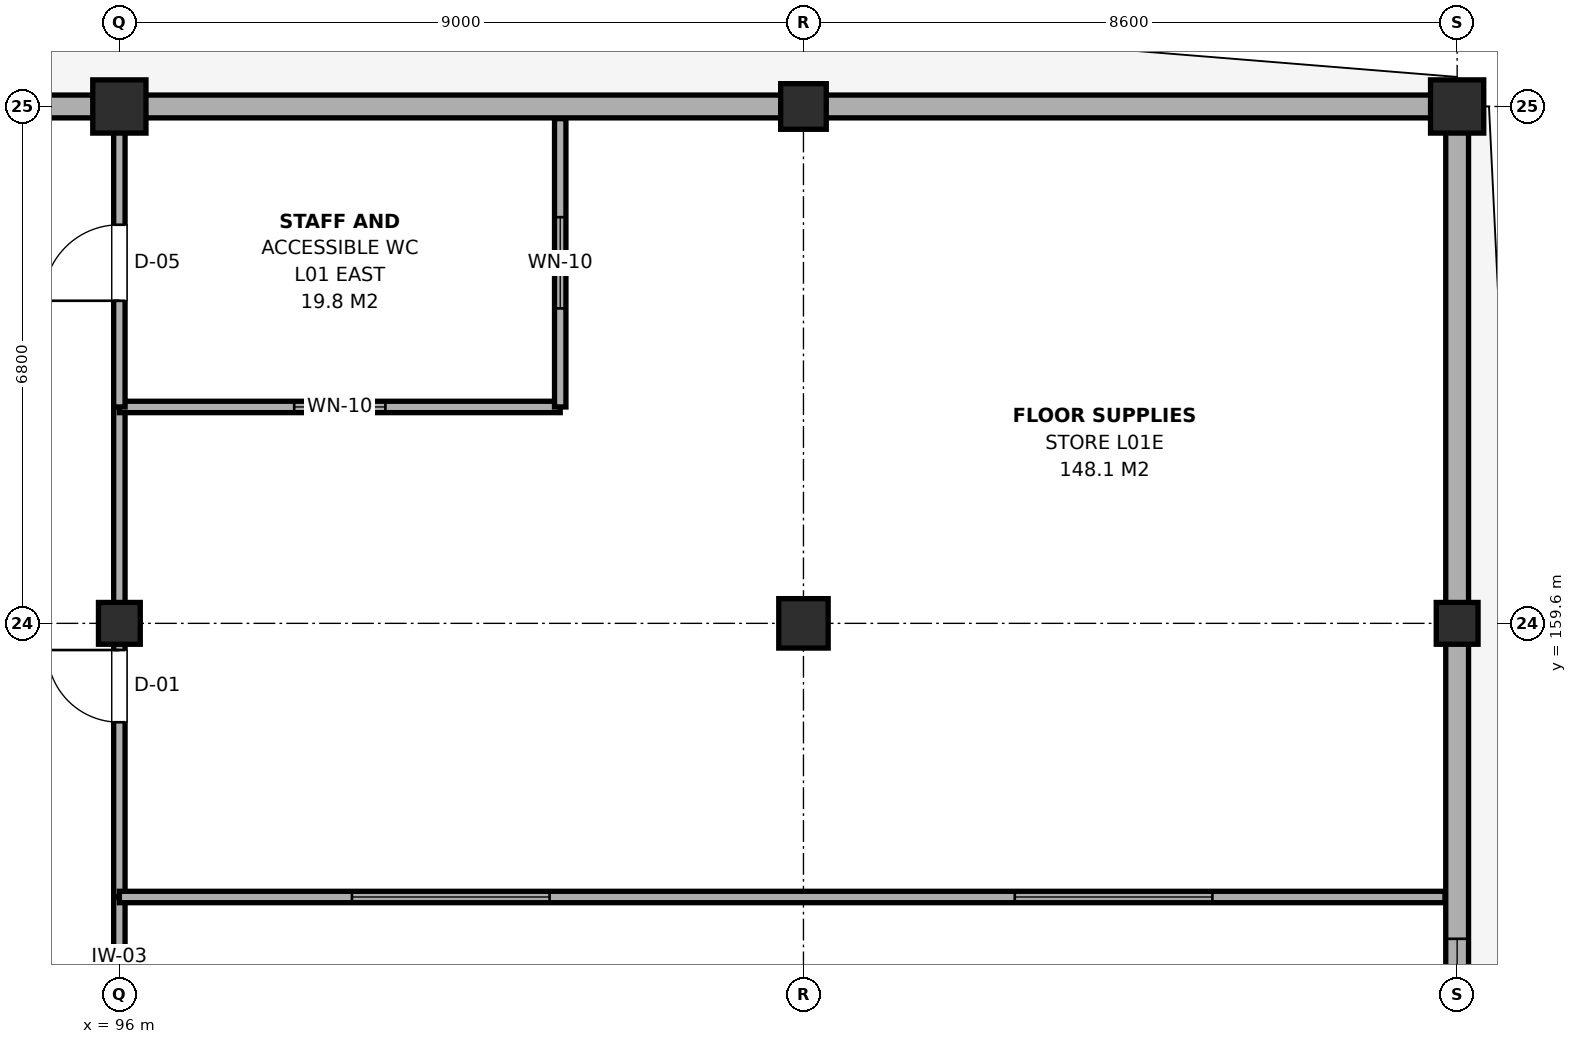
"""IFC4 building model, lengths in metres.
Left out: names, types, materials, properties, quantities, classifications, styles, units other than length and angle.
Written with IfcOpenShell. Run it as: python <this file> out.ifc"""

import sys

from ifc_helpers import new_model, si_unit, direction, frame, frame_2d, origin, origin_2d, place, context, subcontext, project, spatial, rectangle, extrude, element, fill, save


model = new_model("IFC4")
c1 = context("Model", 3, precision=1e-05, world=origin(), true_north=direction((0.0, 1.0)))
c2 = subcontext(c1, "Body", "Model", "MODEL_VIEW")
j1 = project(units=[si_unit("LENGTHUNIT", "METRE"), si_unit("PLANEANGLEUNIT", "RADIAN")], contexts=[c1])
p1 = place(None, origin())
s1 = spatial("IfcSite", under=j1, at=p1, CompositionType="ELEMENT")
p2 = place(p1, origin())
s2 = spatial("IfcBuilding", under=s1, at=p2, CompositionType="ELEMENT")
p3 = place(p2, frame((0.0, 0.0, 4.8)))
s3 = spatial("IfcBuildingStorey", under=s2, at=p3, CompositionType="ELEMENT", Elevation=4.8)
p4 = place(p3, frame((96.0, 159.6, 0.0), z_axis=(0.0, 0.0, 1.0), x_axis=(1.0, 0.0, 0.0)))
e1 = element("IfcColumn", 1, at=p4, inside=s3, PredefinedType="COLUMN", context=c2, shape_type="SweptSolid", body=[
    extrude(rectangle(XDim=0.55, YDim=0.55, at=origin_2d()), origin(), (0.0, 0.0, 1.0), 4.2),
])
p5 = place(p3, frame((96.0, 166.4, 0.0), z_axis=(0.0, 0.0, 1.0), x_axis=(1.0, 0.0, 0.0)))
e2 = element("IfcColumn", 2, at=p5, inside=s3, PredefinedType="COLUMN", context=c2, shape_type="SweptSolid", body=[
    extrude(rectangle(XDim=0.7, YDim=0.7, at=origin_2d()), origin(), (0.0, 0.0, 1.0), 4.2),
])
p6 = place(p3, frame((105.0, 159.6, 0.0), z_axis=(0.0, 0.0, 1.0), x_axis=(1.0, 0.0, 0.0)))
e3 = element("IfcColumn", 3, at=p6, inside=s3, PredefinedType="COLUMN", context=c2, shape_type="SweptSolid", body=[
    extrude(rectangle(XDim=0.65, YDim=0.65, at=origin_2d()), origin(), (0.0, 0.0, 1.0), 4.2),
])
p7 = place(p3, frame((105.0, 166.4, 0.0), z_axis=(0.0, 0.0, 1.0), x_axis=(1.0, 0.0, 0.0)))
e4 = element("IfcColumn", 4, at=p7, inside=s3, PredefinedType="COLUMN", context=c2, shape_type="SweptSolid", body=[
    extrude(rectangle(XDim=0.6, YDim=0.6, at=origin_2d()), origin(), (0.0, 0.0, 1.0), 4.2),
])
p8 = place(p3, frame((113.6, 159.6, 0.0), z_axis=(0.0, 0.0, 1.0), x_axis=(1.0, 0.0, 0.0)))
e5 = element("IfcColumn", 5, at=p8, inside=s3, PredefinedType="COLUMN", context=c2, shape_type="SweptSolid", body=[
    extrude(rectangle(XDim=0.55, YDim=0.55, at=origin_2d()), origin(), (0.0, 0.0, 1.0), 4.2),
])
p9 = place(p3, frame((113.6, 166.4, 0.0), z_axis=(0.0, 0.0, 1.0), x_axis=(1.0, 0.0, 0.0)))
e6 = element("IfcColumn", 6, at=p9, inside=s3, PredefinedType="COLUMN", context=c2, shape_type="SweptSolid", body=[
    extrude(rectangle(XDim=0.7, YDim=0.7, at=origin_2d()), origin(), (0.0, 0.0, 1.0), 4.2),
])
p10 = place(p3, frame((113.6, 152.4, 0.0), z_axis=(0.0, 0.0, 1.0), x_axis=(0.0, 1.0, 0.0)))
e7 = element("IfcWall", 7, at=p10, inside=s3, PredefinedType="SOLIDWALL", context=c2, shape_type="SweptSolid", body=[
    extrude(rectangle(XDim=7.2, YDim=0.3, at=frame_2d((3.6, 0.0))), origin(), (0.0, 0.0, 1.0), 3.375),
])
p11 = place(p10, frame((1.25, 0.0, 1.1)))
e8 = element("IfcOpeningElement", 8, at=p11, cuts=e7, PredefinedType="OPENING", context=c2, shape_type="SweptSolid", body=[
    extrude(rectangle(XDim=1.8, YDim=1.2, at=frame_2d((0.9, 0.6))), frame((0.0, 0.165, 0.0), z_axis=(0.0, -1.0, 0.0), x_axis=(1.0, 0.0, 0.0)), (0.0, 0.0, 1.0), 0.33),
])
p12 = place(p3, frame((113.6, 159.6, 0.0), z_axis=(0.0, 0.0, 1.0), x_axis=(0.0, 1.0, 0.0)))
e9 = element("IfcWall", 9, at=p12, inside=s3, PredefinedType="SOLIDWALL", context=c2, shape_type="SweptSolid", body=[
    extrude(rectangle(XDim=6.95, YDim=0.3, at=frame_2d((3.475, 0.0))), origin(), (0.0, 0.0, 1.0), 3.375),
])
p13 = place(p3, frame((87.0, 166.4, 0.0), z_axis=(0.0, 0.0, 1.0), x_axis=(1.0, 0.0, 0.0)))
e10 = element("IfcWall", 10, at=p13, inside=s3, PredefinedType="SOLIDWALL", context=c2, shape_type="SweptSolid", body=[
    extrude(rectangle(XDim=9.0, YDim=0.3, at=frame_2d((4.5, 0.0))), origin(), (0.0, 0.0, 1.0), 3.485),
])
p14 = place(p13, frame((1.52, 0.0, 0.95)))
e11 = element("IfcOpeningElement", 11, at=p14, cuts=e10, PredefinedType="OPENING", context=c2, shape_type="SweptSolid", body=[
    extrude(rectangle(XDim=2.0, YDim=1.8, at=frame_2d((1.0, 0.9))), frame((0.0, 0.165, 0.0), z_axis=(0.0, -1.0, 0.0), x_axis=(1.0, 0.0, 0.0)), (0.0, 0.0, 1.0), 0.33),
])
p15 = place(p13, frame((4.03, 0.0, 0.95)))
e12 = element("IfcOpeningElement", 12, at=p15, cuts=e10, PredefinedType="OPENING", context=c2, shape_type="SweptSolid", body=[
    extrude(rectangle(XDim=2.0, YDim=1.8, at=frame_2d((1.0, 0.9))), frame((0.0, 0.165, 0.0), z_axis=(0.0, -1.0, 0.0), x_axis=(1.0, 0.0, 0.0)), (0.0, 0.0, 1.0), 0.33),
])
p16 = place(p3, frame((96.0, 166.4, 0.0), z_axis=(0.0, 0.0, 1.0), x_axis=(1.0, 0.0, 0.0)))
e13 = element("IfcWall", 13, at=p16, inside=s3, PredefinedType="SOLIDWALL", context=c2, shape_type="SweptSolid", body=[
    extrude(rectangle(XDim=9.0, YDim=0.3, at=frame_2d((4.5, 0.0))), origin(), (0.0, 0.0, 1.0), 3.585),
])
p17 = place(p3, frame((105.0, 166.4, 0.0), z_axis=(0.0, 0.0, 1.0), x_axis=(1.0, 0.0, 0.0)))
e14 = element("IfcWall", 14, at=p17, inside=s3, PredefinedType="SOLIDWALL", context=c2, shape_type="SweptSolid", body=[
    extrude(rectangle(XDim=8.75, YDim=0.3, at=frame_2d((4.375, 0.0))), origin(), (0.0, 0.0, 1.0), 3.585),
])
p18 = place(p3, frame((96.0, 142.2, 0.0), z_axis=(0.0, 0.0, 1.0), x_axis=(0.0, 1.0, 0.0)))
e15 = element("IfcWall", 15, at=p18, inside=s3, PredefinedType="PARTITIONING", context=c2, shape_type="SweptSolid", body=[
    extrude(rectangle(XDim=13.8, YDim=0.15, at=frame_2d((6.9, 0.0))), origin(), (0.0, 0.0, 1.0), 3.375),
])
p19 = place(p18, frame((6.375, 0.0, 0.0)))
e16 = element("IfcOpeningElement", 16, at=p19, cuts=e15, PredefinedType="OPENING", context=c2, shape_type="SweptSolid", body=[
    extrude(rectangle(XDim=1.05, YDim=2.15, at=frame_2d((0.525, 1.075))), frame((0.0, 0.09, 0.0), z_axis=(0.0, -1.0, 0.0), x_axis=(1.0, 0.0, 0.0)), (0.0, 0.0, 1.0), 0.18),
])
p20 = place(p3, frame((96.0, 156.0, 0.0), z_axis=(0.0, 0.0, 1.0), x_axis=(0.0, 1.0, 0.0)))
e17 = element("IfcWall", 17, at=p20, inside=s3, PredefinedType="PARTITIONING", context=c2, shape_type="SweptSolid", body=[
    extrude(rectangle(XDim=6.447, YDim=0.15, at=frame_2d((3.224, 0.0))), origin(), (0.0, 0.0, 1.0), 3.375),
])
p21 = place(p20, frame((2.299, 0.0, 0.0)))
e18 = element("IfcOpeningElement", 18, at=p21, cuts=e17, PredefinedType="OPENING", context=c2, shape_type="SweptSolid", body=[
    extrude(rectangle(XDim=0.95, YDim=2.15, at=frame_2d((0.475, 1.075))), frame((0.0, 0.09, 0.0), z_axis=(0.0, -1.0, 0.0), x_axis=(1.0, 0.0, 0.0)), (0.0, 0.0, 1.0), 0.18),
])
p22 = place(p3, frame((96.0, 162.447, 0.0), z_axis=(0.0, 0.0, 1.0), x_axis=(1.0, 0.0, 0.0)))
e19 = element("IfcWall", 19, at=p22, inside=s3, PredefinedType="PARTITIONING", context=c2, shape_type="SweptSolid", body=[
    extrude(rectangle(XDim=5.8, YDim=0.15, at=frame_2d((2.9, 0.0))), origin(), (0.0, 0.0, 1.0), 3.425),
])
p23 = place(p22, frame((2.3, 0.0, 0.95)))
e20 = element("IfcOpeningElement", 20, at=p23, cuts=e19, PredefinedType="OPENING", context=c2, shape_type="SweptSolid", body=[
    extrude(rectangle(XDim=1.2, YDim=1.5, at=frame_2d((0.6, 0.75))), frame((0.0, 0.09, 0.0), z_axis=(0.0, -1.0, 0.0), x_axis=(1.0, 0.0, 0.0)), (0.0, 0.0, 1.0), 0.18),
])
p24 = place(p3, frame((101.8, 162.447, 0.0), z_axis=(0.0, 0.0, 1.0), x_axis=(0.0, 1.0, 0.0)))
e21 = element("IfcWall", 21, at=p24, inside=s3, PredefinedType="PARTITIONING", context=c2, shape_type="SweptSolid", body=[
    extrude(rectangle(XDim=3.793, YDim=0.15, at=frame_2d((1.896, 0.0))), origin(), (0.0, 0.0, 1.0), 3.585),
])
p25 = place(p24, frame((1.296, 0.0, 0.95)))
e22 = element("IfcOpeningElement", 22, at=p25, cuts=e21, PredefinedType="OPENING", context=c2, shape_type="SweptSolid", body=[
    extrude(rectangle(XDim=1.2, YDim=1.5, at=frame_2d((0.6, 0.75))), frame((0.0, 0.09, 0.0), z_axis=(0.0, -1.0, 0.0), x_axis=(1.0, 0.0, 0.0)), (0.0, 0.0, 1.0), 0.18),
])
p26 = place(p3, frame((96.0, 162.447, 0.0), z_axis=(0.0, 0.0, 1.0), x_axis=(0.0, 1.0, 0.0)))
e23 = element("IfcWall", 23, at=p26, inside=s3, PredefinedType="PARTITIONING", context=c2, shape_type="SweptSolid", body=[
    extrude(rectangle(XDim=3.793, YDim=0.15, at=frame_2d((1.896, 0.0))), origin(), (0.0, 0.0, 1.0), 3.425),
])
p27 = place(p26, frame((1.397, 0.0, 0.0)))
e24 = element("IfcOpeningElement", 24, at=p27, cuts=e23, PredefinedType="OPENING", context=c2, shape_type="SweptSolid", body=[
    extrude(rectangle(XDim=1.0, YDim=2.15, at=frame_2d((0.5, 1.075))), frame((0.0, 0.09, 0.0), z_axis=(0.0, -1.0, 0.0), x_axis=(1.0, 0.0, 0.0)), (0.0, 0.0, 1.0), 0.18),
])
p28 = place(p3, frame((96.0, 156.0, 0.0), z_axis=(0.0, 0.0, 1.0), x_axis=(1.0, 0.0, 0.0)))
e25 = element("IfcWall", 25, at=p28, inside=s3, PredefinedType="PARTITIONING", context=c2, shape_type="SweptSolid", body=[
    extrude(rectangle(XDim=17.44, YDim=0.15, at=frame_2d((8.72, 0.0))), origin(), (0.0, 0.0, 1.0), 3.375),
])
p29 = place(p28, frame((3.06, 0.0, 0.95)))
e26 = element("IfcOpeningElement", 26, at=p29, cuts=e25, PredefinedType="OPENING", context=c2, shape_type="SweptSolid", body=[
    extrude(rectangle(XDim=2.6, YDim=1.5, at=frame_2d((1.3, 0.75))), frame((0.0, 0.09, 0.0), z_axis=(0.0, -1.0, 0.0), x_axis=(1.0, 0.0, 0.0)), (0.0, 0.0, 1.0), 0.18),
])
p30 = place(p28, frame((11.78, 0.0, 0.95)))
e27 = element("IfcOpeningElement", 27, at=p30, cuts=e25, PredefinedType="OPENING", context=c2, shape_type="SweptSolid", body=[
    extrude(rectangle(XDim=2.6, YDim=1.5, at=frame_2d((1.3, 0.75))), frame((0.0, 0.09, 0.0), z_axis=(0.0, -1.0, 0.0), x_axis=(1.0, 0.0, 0.0)), (0.0, 0.0, 1.0), 0.18),
])
p31 = place(p11, origin())
e28 = element("IfcWindow", 28, at=p31, inside=s3, PartitioningType="SINGLE_PANEL", PredefinedType="WINDOW", context=c2, shape_type="SweptSolid", body=[
    extrude(rectangle(XDim=1.8, YDim=1.2, at=frame_2d((0.9, 0.6))), frame((0.0, 0.03, 0.0), z_axis=(0.0, -1.0, 0.0), x_axis=(1.0, 0.0, 0.0)), (0.0, 0.0, 1.0), 0.06),
])
fill(e8, e28)
p32 = place(p21, origin())
e29 = element("IfcDoor", 29, at=p32, inside=s3, OperationType="SINGLE_SWING_RIGHT", PredefinedType="DOOR", context=c2, shape_type="SweptSolid", body=[
    extrude(rectangle(XDim=0.95, YDim=2.15, at=frame_2d((0.475, 1.075))), frame((0.0, 0.025, 0.0), z_axis=(0.0, -1.0, 0.0), x_axis=(1.0, 0.0, 0.0)), (0.0, 0.0, 1.0), 0.05),
])
fill(e18, e29)
p33 = place(p23, origin())
e30 = element("IfcWindow", 30, at=p33, inside=s3, PartitioningType="SINGLE_PANEL", PredefinedType="WINDOW", context=c2, shape_type="SweptSolid", body=[
    extrude(rectangle(XDim=1.2, YDim=1.5, at=frame_2d((0.6, 0.75))), frame((0.0, 0.03, 0.0), z_axis=(0.0, -1.0, 0.0), x_axis=(1.0, 0.0, 0.0)), (0.0, 0.0, 1.0), 0.06),
])
fill(e20, e30)
p34 = place(p25, origin())
e31 = element("IfcWindow", 31, at=p34, inside=s3, PartitioningType="SINGLE_PANEL", PredefinedType="WINDOW", context=c2, shape_type="SweptSolid", body=[
    extrude(rectangle(XDim=1.2, YDim=1.5, at=frame_2d((0.6, 0.75))), frame((0.0, 0.03, 0.0), z_axis=(0.0, -1.0, 0.0), x_axis=(1.0, 0.0, 0.0)), (0.0, 0.0, 1.0), 0.06),
])
fill(e22, e31)
p35 = place(p27, origin())
e32 = element("IfcDoor", 32, at=p35, inside=s3, OperationType="SINGLE_SWING_LEFT", PredefinedType="DOOR", context=c2, shape_type="SweptSolid", body=[
    extrude(rectangle(XDim=1.0, YDim=2.15, at=frame_2d((0.5, 1.075))), frame((0.0, 0.025, 0.0), z_axis=(0.0, -1.0, 0.0), x_axis=(1.0, 0.0, 0.0)), (0.0, 0.0, 1.0), 0.05),
])
fill(e24, e32)
p36 = place(p29, origin())
e33 = element("IfcWindow", 33, at=p36, inside=s3, PartitioningType="SINGLE_PANEL", PredefinedType="WINDOW", context=c2, shape_type="SweptSolid", body=[
    extrude(rectangle(XDim=2.6, YDim=1.5, at=frame_2d((1.3, 0.75))), frame((0.0, 0.03, 0.0), z_axis=(0.0, -1.0, 0.0), x_axis=(1.0, 0.0, 0.0)), (0.0, 0.0, 1.0), 0.06),
])
fill(e26, e33)
p37 = place(p30, origin())
e34 = element("IfcWindow", 34, at=p37, inside=s3, PartitioningType="SINGLE_PANEL", PredefinedType="WINDOW", context=c2, shape_type="SweptSolid", body=[
    extrude(rectangle(XDim=2.6, YDim=1.5, at=frame_2d((1.3, 0.75))), frame((0.0, 0.03, 0.0), z_axis=(0.0, -1.0, 0.0), x_axis=(1.0, 0.0, 0.0)), (0.0, 0.0, 1.0), 0.06),
])
fill(e27, e34)
save(model, sys.argv[1])
